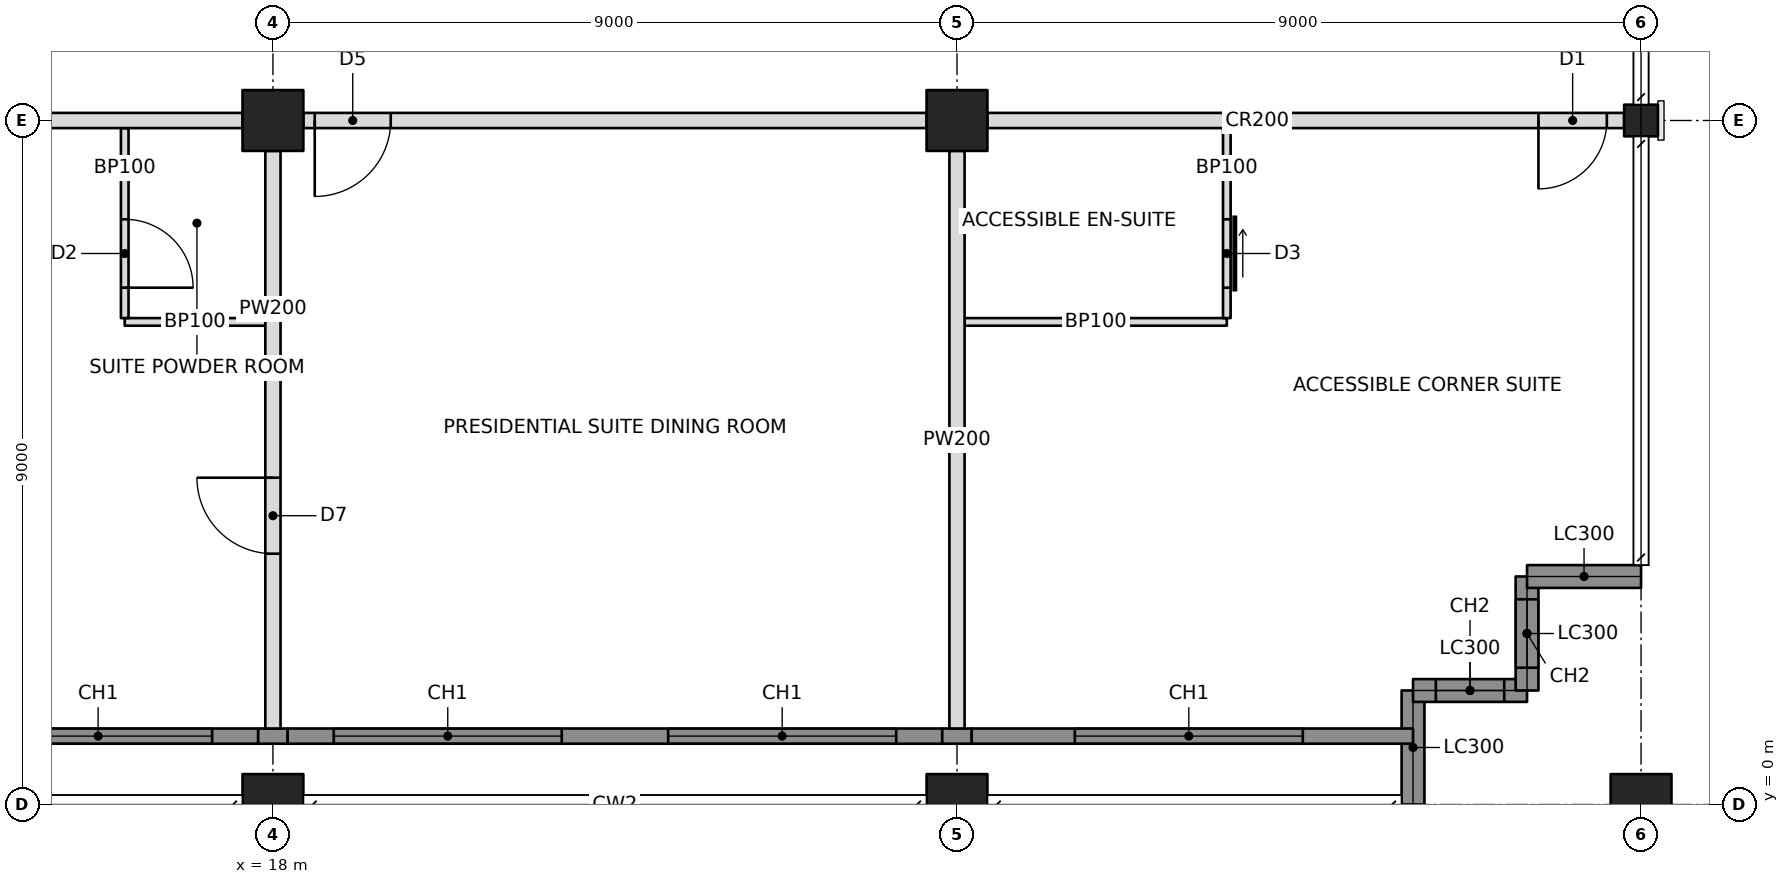
"""IFC4 building model, lengths in metres.
Left out: names, types, materials, properties, quantities, classifications, styles, units other than length and angle.
Written with IfcOpenShell. Run it as: python <this file> out.ifc"""

import sys

from ifc_helpers import new_model, si_unit, direction, frame, frame_2d, origin, origin_2d, place, context, subcontext, project, spatial, rectangle, hollow_rectangle, i_section, extrude, element, fill, save


model = new_model("IFC4")
c1 = context("Model", 3, precision=1e-05, world=origin(), true_north=direction((0.0, 1.0)))
c2 = subcontext(c1, "Body", "Model", "MODEL_VIEW")
j1 = project(units=[si_unit("LENGTHUNIT", "METRE"), si_unit("PLANEANGLEUNIT", "RADIAN")], contexts=[c1])
p1 = place(None, origin())
s1 = spatial("IfcSite", under=j1, at=p1, CompositionType="ELEMENT")
p2 = place(p1, origin())
s2 = spatial("IfcBuilding", under=s1, at=p2, CompositionType="ELEMENT")
p3 = place(p2, frame((0.0, 0.0, 262.6)))
s3 = spatial("IfcBuildingStorey", under=s2, at=p3, CompositionType="ELEMENT", Elevation=262.6)
for number, where, z_axis, x_axis in (
    (1, (18.0, 0.0, 0.0), (0.0, 0.0, 1.0), (1.0, 0.0, 0.0)),
    (2, (18.0, 9.0, 0.0), (0.0, 0.0, 1.0), (1.0, 0.0, 0.0)),
    (3, (27.0, 0.0, 0.0), (0.0, 0.0, 1.0), (1.0, 0.0, 0.0)),
    (4, (27.0, 9.0, 0.0), (0.0, 0.0, 1.0), (1.0, 0.0, 0.0)),
    (5, (36.0, 0.0, 0.0), (0.0, 0.0, 1.0), (1.0, 0.0, 0.0)),
):
    element("IfcColumn", number, at=place(p3, frame(where, z_axis=z_axis, x_axis=x_axis)), inside=s3, PredefinedType="COLUMN", context=c2, shape_type="SweptSolid", body=[
        extrude(hollow_rectangle(XDim=0.8, YDim=0.8, WallThickness=0.032, at=origin_2d()), origin(), (0.0, 0.0, 1.0), 3.6),
    ])
p4 = place(p3, frame((36.0, 9.0, 0.0), z_axis=(0.0, 0.0, 1.0), x_axis=(0.0, 1.0, 0.0)))
e6 = element("IfcColumn", 6, at=p4, inside=s3, PredefinedType="COLUMN", context=c2, shape_type="SweptSolid", body=[
    extrude(i_section(OverallWidth=0.417, OverallDepth=0.445, WebThickness=0.039, FlangeThickness=0.063, at=origin_2d()), origin(), (0.0, 0.0, 1.0), 3.6),
])
p5 = place(p3, frame((33.0, 0.0, 0.0), z_axis=(0.0, 0.0, 1.0), x_axis=(0.0, 1.0, 0.0)))
e7 = element("IfcWall", 7, at=p5, inside=s3, PredefinedType="SOLIDWALL", context=c2, shape_type="SweptSolid", body=[
    extrude(rectangle(XDim=1.5, YDim=0.3, at=frame_2d((0.75, 0.0))), origin(), (0.0, 0.0, 1.0), 2.62),
])
p6 = place(p3, frame((33.0, 1.5, 0.0), z_axis=(0.0, 0.0, 1.0), x_axis=(1.0, 0.0, 0.0)))
e8 = element("IfcWall", 8, at=p6, inside=s3, PredefinedType="SOLIDWALL", context=c2, shape_type="SweptSolid", body=[
    extrude(rectangle(XDim=1.5, YDim=0.3, at=frame_2d((0.75, 0.0))), origin(), (0.0, 0.0, 1.0), 3.4),
])
p7 = place(p6, frame((0.3, 0.0, 0.6)))
e9 = element("IfcOpeningElement", 9, at=p7, cuts=e8, PredefinedType="OPENING", context=c2, shape_type="SweptSolid", body=[
    extrude(rectangle(XDim=0.9, YDim=2.2, at=frame_2d((0.45, 1.1))), frame((0.0, 0.16, 0.0), z_axis=(0.0, -1.0, 0.0), x_axis=(1.0, 0.0, 0.0)), (0.0, 0.0, 1.0), 0.32),
])
p8 = place(p3, frame((34.5, 1.5, 0.0), z_axis=(0.0, 0.0, 1.0), x_axis=(0.0, 1.0, 0.0)))
e10 = element("IfcWall", 10, at=p8, inside=s3, PredefinedType="SOLIDWALL", context=c2, shape_type="SweptSolid", body=[
    extrude(rectangle(XDim=1.5, YDim=0.3, at=frame_2d((0.75, 0.0))), origin(), (0.0, 0.0, 1.0), 3.4),
])
p9 = place(p8, frame((0.3, 0.0, 0.6)))
e11 = element("IfcOpeningElement", 11, at=p9, cuts=e10, PredefinedType="OPENING", context=c2, shape_type="SweptSolid", body=[
    extrude(rectangle(XDim=0.9, YDim=2.2, at=frame_2d((0.45, 1.1))), frame((0.0, 0.16, 0.0), z_axis=(0.0, -1.0, 0.0), x_axis=(1.0, 0.0, 0.0)), (0.0, 0.0, 1.0), 0.32),
])
p10 = place(p3, frame((34.5, 3.0, 0.0), z_axis=(0.0, 0.0, 1.0), x_axis=(1.0, 0.0, 0.0)))
e12 = element("IfcWall", 12, at=p10, inside=s3, PredefinedType="SOLIDWALL", context=c2, shape_type="SweptSolid", body=[
    extrude(rectangle(XDim=1.5, YDim=0.3, at=frame_2d((0.75, 0.0))), origin(), (0.0, 0.0, 1.0), 2.62),
])
p11 = place(p3, frame((9.4, 9.0, 0.0), z_axis=(0.0, 0.0, 1.0), x_axis=(1.0, 0.0, 0.0)))
e13 = element("IfcWall", 13, at=p11, inside=s3, PredefinedType="PARTITIONING", context=c2, shape_type="SweptSolid", body=[
    extrude(rectangle(XDim=8.2, YDim=0.2, at=frame_2d((4.1, 0.0))), origin(), (0.0, 0.0, 1.0), 2.605),
])
p12 = place(p11, frame((0.15, 0.0, 0.0)))
e14 = element("IfcOpeningElement", 14, at=p12, cuts=e13, PredefinedType="OPENING", context=c2, shape_type="SweptSolid", body=[
    extrude(rectangle(XDim=0.9, YDim=2.1, at=frame_2d((0.45, 1.05))), frame((0.0, 0.11, 0.0), z_axis=(0.0, -1.0, 0.0), x_axis=(1.0, 0.0, 0.0)), (0.0, 0.0, 1.0), 0.22),
])
p13 = place(p3, frame((18.4, 9.0, 0.0), z_axis=(0.0, 0.0, 1.0), x_axis=(1.0, 0.0, 0.0)))
e15 = element("IfcWall", 15, at=p13, inside=s3, PredefinedType="PARTITIONING", context=c2, shape_type="SweptSolid", body=[
    extrude(rectangle(XDim=8.2, YDim=0.2, at=frame_2d((4.1, 0.0))), origin(), (0.0, 0.0, 1.0), 2.605),
])
p14 = place(p13, frame((0.15, 0.0, 0.0)))
e16 = element("IfcOpeningElement", 16, at=p14, cuts=e15, PredefinedType="OPENING", context=c2, shape_type="SweptSolid", body=[
    extrude(rectangle(XDim=1.0, YDim=2.1, at=frame_2d((0.5, 1.05))), frame((0.0, 0.11, 0.0), z_axis=(0.0, -1.0, 0.0), x_axis=(1.0, 0.0, 0.0)), (0.0, 0.0, 1.0), 0.22),
])
p15 = place(p3, frame((27.4, 9.0, 0.0), z_axis=(0.0, 0.0, 1.0), x_axis=(1.0, 0.0, 0.0)))
e17 = element("IfcWall", 17, at=p15, inside=s3, PredefinedType="PARTITIONING", context=c2, shape_type="SweptSolid", body=[
    extrude(rectangle(XDim=8.378, YDim=0.2, at=frame_2d((4.189, 0.0))), origin(), (0.0, 0.0, 1.0), 2.605),
])
p16 = place(p15, frame((7.25, 0.0, 0.0)))
e18 = element("IfcOpeningElement", 18, at=p16, cuts=e17, PredefinedType="OPENING", context=c2, shape_type="SweptSolid", body=[
    extrude(rectangle(XDim=0.9, YDim=2.1, at=frame_2d((0.45, 1.05))), frame((0.0, 0.11, 0.0), z_axis=(0.0, -1.0, 0.0), x_axis=(1.0, 0.0, 0.0)), (0.0, 0.0, 1.0), 0.22),
])
p17 = place(p3, frame((18.0, 8.6, 0.0), z_axis=(0.0, 0.0, 1.0), x_axis=(0.0, -1.0, 0.0)))
e19 = element("IfcWall", 19, at=p17, inside=s3, PredefinedType="PARTITIONING", context=c2, shape_type="SweptSolid", body=[
    extrude(rectangle(XDim=7.6, YDim=0.2, at=frame_2d((3.8, 0.0))), origin(), (0.0, 0.0, 1.0), 2.605),
])
p18 = place(p17, frame((4.3, 0.0, 0.0)))
e20 = element("IfcOpeningElement", 20, at=p18, cuts=e19, PredefinedType="OPENING", context=c2, shape_type="SweptSolid", body=[
    extrude(rectangle(XDim=1.0, YDim=2.1, at=frame_2d((0.5, 1.05))), frame((0.0, 0.11, 0.0), z_axis=(0.0, -1.0, 0.0), x_axis=(1.0, 0.0, 0.0)), (0.0, 0.0, 1.0), 0.22),
])
p19 = place(p3, frame((27.0, 8.6, 0.0), z_axis=(0.0, 0.0, 1.0), x_axis=(0.0, -1.0, 0.0)))
e21 = element("IfcWall", 21, at=p19, inside=s3, PredefinedType="PARTITIONING", context=c2, shape_type="SweptSolid", body=[
    extrude(rectangle(XDim=7.6, YDim=0.2, at=frame_2d((3.8, 0.0))), origin(), (0.0, 0.0, 1.0), 2.605),
])
p20 = place(p3, frame((16.05, 6.35, 0.0), z_axis=(0.0, 0.0, 1.0), x_axis=(1.0, 0.0, 0.0)))
e22 = element("IfcWall", 22, at=p20, inside=s3, PredefinedType="PARTITIONING", context=c2, shape_type="SweptSolid", body=[
    extrude(rectangle(XDim=1.85, YDim=0.1, at=frame_2d((0.925, 0.0))), origin(), (0.0, 0.0, 1.0), 2.604),
])
p21 = place(p3, frame((16.05, 8.9, 0.0), z_axis=(0.0, 0.0, 1.0), x_axis=(0.0, -1.0, 0.0)))
e23 = element("IfcWall", 23, at=p21, inside=s3, PredefinedType="PARTITIONING", context=c2, shape_type="SweptSolid", body=[
    extrude(rectangle(XDim=2.5, YDim=0.1, at=frame_2d((1.25, 0.0))), origin(), (0.0, 0.0, 1.0), 2.604),
])
p22 = place(p21, frame((1.2, 0.0, 0.0)))
e24 = element("IfcOpeningElement", 24, at=p22, cuts=e23, PredefinedType="OPENING", context=c2, shape_type="SweptSolid", body=[
    extrude(rectangle(XDim=0.9, YDim=2.1, at=frame_2d((0.45, 1.05))), frame((0.0, 0.06, 0.0), z_axis=(0.0, -1.0, 0.0), x_axis=(1.0, 0.0, 0.0)), (0.0, 0.0, 1.0), 0.12),
])
p23 = place(p3, frame((27.1, 6.35, 0.0), z_axis=(0.0, 0.0, 1.0), x_axis=(1.0, 0.0, 0.0)))
e25 = element("IfcWall", 25, at=p23, inside=s3, PredefinedType="PARTITIONING", context=c2, shape_type="SweptSolid", body=[
    extrude(rectangle(XDim=3.45, YDim=0.1, at=frame_2d((1.725, 0.0))), origin(), (0.0, 0.0, 1.0), 2.604),
])
p24 = place(p3, frame((30.55, 8.9, 0.0), z_axis=(0.0, 0.0, 1.0), x_axis=(0.0, -1.0, 0.0)))
e26 = element("IfcWall", 26, at=p24, inside=s3, PredefinedType="PARTITIONING", context=c2, shape_type="SweptSolid", body=[
    extrude(rectangle(XDim=2.5, YDim=0.1, at=frame_2d((1.25, 0.0))), origin(), (0.0, 0.0, 1.0), 2.604),
])
p25 = place(p24, frame((1.2, 0.0, 0.0)))
e27 = element("IfcOpeningElement", 27, at=p25, cuts=e26, PredefinedType="OPENING", context=c2, shape_type="SweptSolid", body=[
    extrude(rectangle(XDim=0.9, YDim=2.1, at=frame_2d((0.45, 1.05))), frame((0.0, 0.06, 0.0), z_axis=(0.0, -1.0, 0.0), x_axis=(1.0, 0.0, 0.0)), (0.0, 0.0, 1.0), 0.12),
])
p26 = place(p3, frame((9.135, 0.9, 0.0), z_axis=(0.0, 0.0, 1.0), x_axis=(1.0, 0.0, 0.0)))
e28 = element("IfcWall", 28, at=p26, inside=s3, PredefinedType="SOLIDWALL", context=c2, shape_type="SweptSolid", body=[
    extrude(rectangle(XDim=8.671, YDim=0.2, at=frame_2d((4.335, 0.0))), origin(), (0.0, 0.0, 1.0), 3.4),
])
p27 = place(p26, frame((0.665, 0.0, 0.6)))
e29 = element("IfcOpeningElement", 29, at=p27, cuts=e28, PredefinedType="OPENING", context=c2, shape_type="SweptSolid", body=[
    extrude(rectangle(XDim=3.0, YDim=2.2, at=frame_2d((1.5, 1.1))), frame((0.0, 0.11, 0.0), z_axis=(0.0, -1.0, 0.0), x_axis=(1.0, 0.0, 0.0)), (0.0, 0.0, 1.0), 0.22),
])
p28 = place(p26, frame((5.065, 0.0, 0.6)))
e30 = element("IfcOpeningElement", 30, at=p28, cuts=e28, PredefinedType="OPENING", context=c2, shape_type="SweptSolid", body=[
    extrude(rectangle(XDim=3.0, YDim=2.2, at=frame_2d((1.5, 1.1))), frame((0.0, 0.11, 0.0), z_axis=(0.0, -1.0, 0.0), x_axis=(1.0, 0.0, 0.0)), (0.0, 0.0, 1.0), 0.22),
])
p29 = place(p3, frame((17.806, 0.9, 0.0), z_axis=(0.0, 0.0, 1.0), x_axis=(1.0, 0.0, 0.0)))
e31 = element("IfcWall", 31, at=p29, inside=s3, PredefinedType="SOLIDWALL", context=c2, shape_type="SweptSolid", body=[
    extrude(rectangle(XDim=0.388, YDim=0.2, at=frame_2d((0.194, 0.0))), origin(), (0.0, 0.0, 1.0), 2.604),
])
p30 = place(p3, frame((18.194, 0.9, 0.0), z_axis=(0.0, 0.0, 1.0), x_axis=(1.0, 0.0, 0.0)))
e32 = element("IfcWall", 32, at=p30, inside=s3, PredefinedType="SOLIDWALL", context=c2, shape_type="SweptSolid", body=[
    extrude(rectangle(XDim=8.612, YDim=0.2, at=frame_2d((4.306, 0.0))), origin(), (0.0, 0.0, 1.0), 3.4),
])
p31 = place(p30, frame((0.606, 0.0, 0.6)))
e33 = element("IfcOpeningElement", 33, at=p31, cuts=e32, PredefinedType="OPENING", context=c2, shape_type="SweptSolid", body=[
    extrude(rectangle(XDim=3.0, YDim=2.2, at=frame_2d((1.5, 1.1))), frame((0.0, 0.11, 0.0), z_axis=(0.0, -1.0, 0.0), x_axis=(1.0, 0.0, 0.0)), (0.0, 0.0, 1.0), 0.22),
])
p32 = place(p30, frame((5.006, 0.0, 0.6)))
e34 = element("IfcOpeningElement", 34, at=p32, cuts=e32, PredefinedType="OPENING", context=c2, shape_type="SweptSolid", body=[
    extrude(rectangle(XDim=3.0, YDim=2.2, at=frame_2d((1.5, 1.1))), frame((0.0, 0.11, 0.0), z_axis=(0.0, -1.0, 0.0), x_axis=(1.0, 0.0, 0.0)), (0.0, 0.0, 1.0), 0.22),
])
p33 = place(p3, frame((26.806, 0.9, 0.0), z_axis=(0.0, 0.0, 1.0), x_axis=(1.0, 0.0, 0.0)))
e35 = element("IfcWall", 35, at=p33, inside=s3, PredefinedType="SOLIDWALL", context=c2, shape_type="SweptSolid", body=[
    extrude(rectangle(XDim=0.388, YDim=0.2, at=frame_2d((0.194, 0.0))), origin(), (0.0, 0.0, 1.0), 2.604),
])
p34 = place(p3, frame((27.194, 0.9, 0.0), z_axis=(0.0, 0.0, 1.0), x_axis=(1.0, 0.0, 0.0)))
e36 = element("IfcWall", 36, at=p34, inside=s3, PredefinedType="SOLIDWALL", context=c2, shape_type="SweptSolid", body=[
    extrude(rectangle(XDim=5.806, YDim=0.2, at=frame_2d((2.903, 0.0))), origin(), (0.0, 0.0, 1.0), 3.4),
])
p35 = place(p34, frame((1.356, 0.0, 0.6)))
e37 = element("IfcOpeningElement", 37, at=p35, cuts=e36, PredefinedType="OPENING", context=c2, shape_type="SweptSolid", body=[
    extrude(rectangle(XDim=3.0, YDim=2.2, at=frame_2d((1.5, 1.1))), frame((0.0, 0.11, 0.0), z_axis=(0.0, -1.0, 0.0), x_axis=(1.0, 0.0, 0.0)), (0.0, 0.0, 1.0), 0.22),
])
p36 = place(p7, origin())
e38 = element("IfcWindow", 38, at=p36, inside=s3, PartitioningType="SINGLE_PANEL", PredefinedType="WINDOW", context=c2, shape_type="SweptSolid", body=[
    extrude(rectangle(XDim=0.9, YDim=2.2, at=frame_2d((0.45, 1.1))), frame((0.0, 0.03, 0.0), z_axis=(0.0, -1.0, 0.0), x_axis=(1.0, 0.0, 0.0)), (0.0, 0.0, 1.0), 0.06),
])
fill(e9, e38)
p37 = place(p9, origin())
e39 = element("IfcWindow", 39, at=p37, inside=s3, PartitioningType="SINGLE_PANEL", PredefinedType="WINDOW", context=c2, shape_type="SweptSolid", body=[
    extrude(rectangle(XDim=0.9, YDim=2.2, at=frame_2d((0.45, 1.1))), frame((0.0, 0.03, 0.0), z_axis=(0.0, -1.0, 0.0), x_axis=(1.0, 0.0, 0.0)), (0.0, 0.0, 1.0), 0.06),
])
fill(e11, e39)
p38 = place(p28, origin())
e40 = element("IfcWindow", 40, at=p38, inside=s3, PartitioningType="TRIPLE_PANEL_VERTICAL", PredefinedType="WINDOW", context=c2, shape_type="SweptSolid", body=[
    extrude(rectangle(XDim=3.0, YDim=2.2, at=frame_2d((1.5, 1.1))), frame((0.0, 0.03, 0.0), z_axis=(0.0, -1.0, 0.0), x_axis=(1.0, 0.0, 0.0)), (0.0, 0.0, 1.0), 0.06),
])
fill(e30, e40)
p39 = place(p31, origin())
e41 = element("IfcWindow", 41, at=p39, inside=s3, PartitioningType="TRIPLE_PANEL_VERTICAL", PredefinedType="WINDOW", context=c2, shape_type="SweptSolid", body=[
    extrude(rectangle(XDim=3.0, YDim=2.2, at=frame_2d((1.5, 1.1))), frame((0.0, 0.03, 0.0), z_axis=(0.0, -1.0, 0.0), x_axis=(1.0, 0.0, 0.0)), (0.0, 0.0, 1.0), 0.06),
])
fill(e33, e41)
p40 = place(p32, origin())
e42 = element("IfcWindow", 42, at=p40, inside=s3, PartitioningType="TRIPLE_PANEL_VERTICAL", PredefinedType="WINDOW", context=c2, shape_type="SweptSolid", body=[
    extrude(rectangle(XDim=3.0, YDim=2.2, at=frame_2d((1.5, 1.1))), frame((0.0, 0.03, 0.0), z_axis=(0.0, -1.0, 0.0), x_axis=(1.0, 0.0, 0.0)), (0.0, 0.0, 1.0), 0.06),
])
fill(e34, e42)
p41 = place(p35, origin())
e43 = element("IfcWindow", 43, at=p41, inside=s3, PartitioningType="TRIPLE_PANEL_VERTICAL", PredefinedType="WINDOW", context=c2, shape_type="SweptSolid", body=[
    extrude(rectangle(XDim=3.0, YDim=2.2, at=frame_2d((1.5, 1.1))), frame((0.0, 0.03, 0.0), z_axis=(0.0, -1.0, 0.0), x_axis=(1.0, 0.0, 0.0)), (0.0, 0.0, 1.0), 0.06),
])
fill(e37, e43)
p42 = place(p18, frame((1.0, 0.0, 0.0), z_axis=(0.0, 0.0, 1.0), x_axis=(-1.0, 0.0, 0.0)))
e44 = element("IfcDoor", 44, at=p42, inside=s3, OperationType="SINGLE_SWING_RIGHT", PredefinedType="DOOR", context=c2, shape_type="SweptSolid", body=[
    extrude(rectangle(XDim=1.0, YDim=2.1, at=frame_2d((0.5, 1.05))), frame((0.0, 0.025, 0.0), z_axis=(0.0, -1.0, 0.0), x_axis=(1.0, 0.0, 0.0)), (0.0, 0.0, 1.0), 0.05),
])
fill(e20, e44)
p43 = place(p22, origin())
e45 = element("IfcDoor", 45, at=p43, inside=s3, OperationType="SINGLE_SWING_RIGHT", PredefinedType="DOOR", context=c2, shape_type="SweptSolid", body=[
    extrude(rectangle(XDim=0.9, YDim=2.1, at=frame_2d((0.45, 1.05))), frame((0.0, 0.025, 0.0), z_axis=(0.0, -1.0, 0.0), x_axis=(1.0, 0.0, 0.0)), (0.0, 0.0, 1.0), 0.05),
])
fill(e24, e45)
p44 = place(p14, frame((1.0, 0.0, 0.0), z_axis=(0.0, 0.0, 1.0), x_axis=(-1.0, 0.0, 0.0)))
e46 = element("IfcDoor", 46, at=p44, inside=s3, OperationType="SINGLE_SWING_RIGHT", PredefinedType="DOOR", context=c2, shape_type="SweptSolid", body=[
    extrude(rectangle(XDim=1.0, YDim=2.1, at=frame_2d((0.5, 1.05))), frame((0.0, 0.025, 0.0), z_axis=(0.0, -1.0, 0.0), x_axis=(1.0, 0.0, 0.0)), (0.0, 0.0, 1.0), 0.05),
])
fill(e16, e46)
p45 = place(p25, origin())
e47 = element("IfcDoor", 47, at=p45, inside=s3, OperationType="SLIDING_TO_LEFT", PredefinedType="DOOR", context=c2, shape_type="SweptSolid", body=[
    extrude(rectangle(XDim=0.9, YDim=2.1, at=frame_2d((0.45, 1.05))), frame((0.0, 0.025, 0.0), z_axis=(0.0, -1.0, 0.0), x_axis=(1.0, 0.0, 0.0)), (0.0, 0.0, 1.0), 0.05),
])
fill(e27, e47)
p46 = place(p16, frame((0.9, 0.0, 0.0), z_axis=(0.0, 0.0, 1.0), x_axis=(-1.0, 0.0, 0.0)))
e48 = element("IfcDoor", 48, at=p46, inside=s3, OperationType="SINGLE_SWING_RIGHT", PredefinedType="DOOR", context=c2, shape_type="SweptSolid", body=[
    extrude(rectangle(XDim=0.9, YDim=2.1, at=frame_2d((0.45, 1.05))), frame((0.0, 0.025, 0.0), z_axis=(0.0, -1.0, 0.0), x_axis=(1.0, 0.0, 0.0)), (0.0, 0.0, 1.0), 0.05),
])
fill(e18, e48)
save(model, sys.argv[1])
